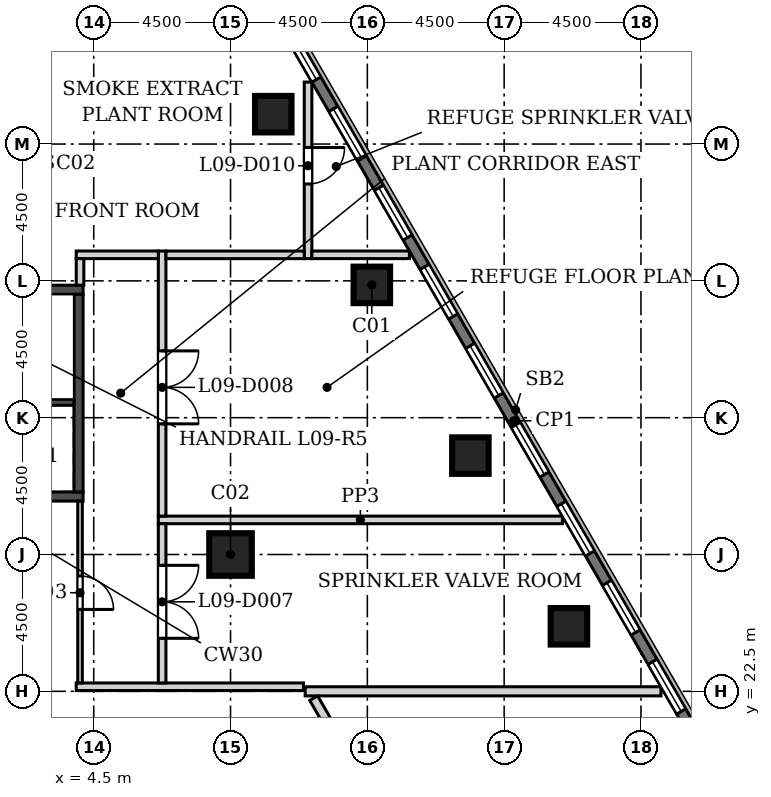
"""IFC4 building model, lengths in metres.
Left out: names, types, materials, properties, quantities, classifications, styles, units other than length and angle.
Written with IfcOpenShell. Run it as: python <this file> out.ifc"""

import sys

from ifc_helpers import new_model, si_unit, direction, frame, frame_2d, origin, origin_2d, place, context, subcontext, project, spatial, rectangle, extrude, element, fill, save


model = new_model("IFC4")
c1 = context("Model", 3, precision=1e-05, world=origin(), true_north=direction((0.0, 1.0)))
c2 = subcontext(c1, "Body", "Model", "MODEL_VIEW")
j1 = project(units=[si_unit("LENGTHUNIT", "METRE"), si_unit("PLANEANGLEUNIT", "RADIAN")], contexts=[c1])
p1 = place(None, origin())
s1 = spatial("IfcSite", under=j1, at=p1, CompositionType="ELEMENT")
p2 = place(p1, origin())
s2 = spatial("IfcBuilding", under=s1, at=p2, CompositionType="ELEMENT")
p3 = place(p2, frame((0.0, 0.0, 47.5)))
s3 = spatial("IfcBuildingStorey", under=s2, at=p3, CompositionType="ELEMENT", Elevation=47.5)
for number, where, z_axis, x_axis in (
    (1, (20.131, 24.638, 0.0), (0.0, 0.0, 1.0), (1.0, 0.0, 0.0)),
    (2, (16.889, 30.253, 0.0), (0.0, 0.0, 1.0), (1.0, 0.0, 0.0)),
    (3, (13.648, 35.868, 0.0), (0.0, 0.0, 1.0), (1.0, 0.0, 0.0)),
    (4, (10.406, 41.482, 0.0), (0.0, 0.0, 1.0), (1.0, 0.0, 0.0)),
):
    element("IfcColumn", number, at=place(p3, frame(where, z_axis=z_axis, x_axis=x_axis)), inside=s3, PredefinedType="COLUMN", context=c2, shape_type="SweptSolid", body=[
        extrude(rectangle(XDim=1.2, YDim=1.2, at=origin_2d()), origin(), (0.0, 0.0, 1.0), 5.4),
    ])
p4 = place(p3, frame((9.0, 27.0, 0.0), z_axis=(0.0, 0.0, 1.0), x_axis=(1.0, 0.0, 0.0)))
e5 = element("IfcColumn", 5, at=p4, inside=s3, PredefinedType="COLUMN", context=c2, shape_type="SweptSolid", body=[
    extrude(rectangle(XDim=1.4, YDim=1.4, at=origin_2d()), origin(), (0.0, 0.0, 1.0), 5.4),
])
p5 = place(p3, frame((31.98, 7.709, 0.0), z_axis=(0.0, 0.0, 1.0), x_axis=(-0.500000125387, 0.866025331392, 0.0)))
e6 = element("IfcWall", 6, at=p5, inside=s3, PredefinedType="SOLIDWALL", context=c2, shape_type="SweptSolid", body=[
    extrude(rectangle(XDim=55.255, YDim=0.34, at=frame_2d((27.628, 0.0))), origin(), (0.0, 0.0, 1.0), 5.1),
])
p6 = place(p5, frame((1.314, 0.0, 0.9)))
e7 = element("IfcOpeningElement", 7, at=p6, cuts=e6, PredefinedType="OPENING", context=c2, shape_type="SweptSolid", body=[
    extrude(rectangle(XDim=1.885, YDim=3.0, at=frame_2d((0.942, 1.5))), frame((0.0, 0.18, 0.0), z_axis=(0.0, -1.0, 0.0), x_axis=(1.0, 0.0, 0.0)), (0.0, 0.0, 1.0), 0.36),
])
p7 = place(p5, frame((4.314, 0.0, 0.9)))
e8 = element("IfcOpeningElement", 8, at=p7, cuts=e6, PredefinedType="OPENING", context=c2, shape_type="SweptSolid", body=[
    extrude(rectangle(XDim=1.885, YDim=3.0, at=frame_2d((0.942, 1.5))), frame((0.0, 0.18, 0.0), z_axis=(0.0, -1.0, 0.0), x_axis=(1.0, 0.0, 0.0)), (0.0, 0.0, 1.0), 0.36),
])
p8 = place(p5, frame((7.314, 0.0, 0.9)))
e9 = element("IfcOpeningElement", 9, at=p8, cuts=e6, PredefinedType="OPENING", context=c2, shape_type="SweptSolid", body=[
    extrude(rectangle(XDim=1.885, YDim=3.0, at=frame_2d((0.942, 1.5))), frame((0.0, 0.18, 0.0), z_axis=(0.0, -1.0, 0.0), x_axis=(1.0, 0.0, 0.0)), (0.0, 0.0, 1.0), 0.36),
])
p9 = place(p5, frame((10.314, 0.0, 0.9)))
e10 = element("IfcOpeningElement", 10, at=p9, cuts=e6, PredefinedType="OPENING", context=c2, shape_type="SweptSolid", body=[
    extrude(rectangle(XDim=1.885, YDim=3.0, at=frame_2d((0.942, 1.5))), frame((0.0, 0.18, 0.0), z_axis=(0.0, -1.0, 0.0), x_axis=(1.0, 0.0, 0.0)), (0.0, 0.0, 1.0), 0.36),
])
p10 = place(p5, frame((13.314, 0.0, 0.9)))
e11 = element("IfcOpeningElement", 11, at=p10, cuts=e6, PredefinedType="OPENING", context=c2, shape_type="SweptSolid", body=[
    extrude(rectangle(XDim=1.885, YDim=3.0, at=frame_2d((0.942, 1.5))), frame((0.0, 0.18, 0.0), z_axis=(0.0, -1.0, 0.0), x_axis=(1.0, 0.0, 0.0)), (0.0, 0.0, 1.0), 0.36),
])
p11 = place(p5, frame((16.314, 0.0, 0.9)))
e12 = element("IfcOpeningElement", 12, at=p11, cuts=e6, PredefinedType="OPENING", context=c2, shape_type="SweptSolid", body=[
    extrude(rectangle(XDim=1.885, YDim=3.0, at=frame_2d((0.942, 1.5))), frame((0.0, 0.18, 0.0), z_axis=(0.0, -1.0, 0.0), x_axis=(1.0, 0.0, 0.0)), (0.0, 0.0, 1.0), 0.36),
])
p12 = place(p5, frame((19.314, 0.0, 0.9)))
e13 = element("IfcOpeningElement", 13, at=p12, cuts=e6, PredefinedType="OPENING", context=c2, shape_type="SweptSolid", body=[
    extrude(rectangle(XDim=1.885, YDim=3.0, at=frame_2d((0.942, 1.5))), frame((0.0, 0.18, 0.0), z_axis=(0.0, -1.0, 0.0), x_axis=(1.0, 0.0, 0.0)), (0.0, 0.0, 1.0), 0.36),
])
p13 = place(p5, frame((22.314, 0.0, 0.9)))
e14 = element("IfcOpeningElement", 14, at=p13, cuts=e6, PredefinedType="OPENING", context=c2, shape_type="SweptSolid", body=[
    extrude(rectangle(XDim=1.885, YDim=3.0, at=frame_2d((0.942, 1.5))), frame((0.0, 0.18, 0.0), z_axis=(0.0, -1.0, 0.0), x_axis=(1.0, 0.0, 0.0)), (0.0, 0.0, 1.0), 0.36),
])
p14 = place(p5, frame((25.314, 0.0, 0.9)))
e15 = element("IfcOpeningElement", 15, at=p14, cuts=e6, PredefinedType="OPENING", context=c2, shape_type="SweptSolid", body=[
    extrude(rectangle(XDim=1.885, YDim=3.0, at=frame_2d((0.942, 1.5))), frame((0.0, 0.18, 0.0), z_axis=(0.0, -1.0, 0.0), x_axis=(1.0, 0.0, 0.0)), (0.0, 0.0, 1.0), 0.36),
])
p15 = place(p5, frame((28.314, 0.0, 0.9)))
e16 = element("IfcOpeningElement", 16, at=p15, cuts=e6, PredefinedType="OPENING", context=c2, shape_type="SweptSolid", body=[
    extrude(rectangle(XDim=1.885, YDim=3.0, at=frame_2d((0.942, 1.5))), frame((0.0, 0.18, 0.0), z_axis=(0.0, -1.0, 0.0), x_axis=(1.0, 0.0, 0.0)), (0.0, 0.0, 1.0), 0.36),
])
p16 = place(p5, frame((31.314, 0.0, 0.9)))
e17 = element("IfcOpeningElement", 17, at=p16, cuts=e6, PredefinedType="OPENING", context=c2, shape_type="SweptSolid", body=[
    extrude(rectangle(XDim=1.885, YDim=3.0, at=frame_2d((0.942, 1.5))), frame((0.0, 0.18, 0.0), z_axis=(0.0, -1.0, 0.0), x_axis=(1.0, 0.0, 0.0)), (0.0, 0.0, 1.0), 0.36),
])
p17 = place(p5, frame((34.314, 0.0, 0.9)))
e18 = element("IfcOpeningElement", 18, at=p17, cuts=e6, PredefinedType="OPENING", context=c2, shape_type="SweptSolid", body=[
    extrude(rectangle(XDim=1.885, YDim=3.0, at=frame_2d((0.942, 1.5))), frame((0.0, 0.18, 0.0), z_axis=(0.0, -1.0, 0.0), x_axis=(1.0, 0.0, 0.0)), (0.0, 0.0, 1.0), 0.36),
])
p18 = place(p5, frame((37.314, 0.0, 0.9)))
e19 = element("IfcOpeningElement", 19, at=p18, cuts=e6, PredefinedType="OPENING", context=c2, shape_type="SweptSolid", body=[
    extrude(rectangle(XDim=1.885, YDim=3.0, at=frame_2d((0.942, 1.5))), frame((0.0, 0.18, 0.0), z_axis=(0.0, -1.0, 0.0), x_axis=(1.0, 0.0, 0.0)), (0.0, 0.0, 1.0), 0.36),
])
p19 = place(p5, frame((40.314, 0.0, 0.9)))
e20 = element("IfcOpeningElement", 20, at=p19, cuts=e6, PredefinedType="OPENING", context=c2, shape_type="SweptSolid", body=[
    extrude(rectangle(XDim=1.885, YDim=3.0, at=frame_2d((0.942, 1.5))), frame((0.0, 0.18, 0.0), z_axis=(0.0, -1.0, 0.0), x_axis=(1.0, 0.0, 0.0)), (0.0, 0.0, 1.0), 0.36),
])
p20 = place(p5, frame((43.314, 0.0, 0.9)))
e21 = element("IfcOpeningElement", 21, at=p20, cuts=e6, PredefinedType="OPENING", context=c2, shape_type="SweptSolid", body=[
    extrude(rectangle(XDim=1.885, YDim=3.0, at=frame_2d((0.942, 1.5))), frame((0.0, 0.18, 0.0), z_axis=(0.0, -1.0, 0.0), x_axis=(1.0, 0.0, 0.0)), (0.0, 0.0, 1.0), 0.36),
])
p21 = place(p5, frame((46.314, 0.0, 0.9)))
e22 = element("IfcOpeningElement", 22, at=p21, cuts=e6, PredefinedType="OPENING", context=c2, shape_type="SweptSolid", body=[
    extrude(rectangle(XDim=1.885, YDim=3.0, at=frame_2d((0.942, 1.5))), frame((0.0, 0.18, 0.0), z_axis=(0.0, -1.0, 0.0), x_axis=(1.0, 0.0, 0.0)), (0.0, 0.0, 1.0), 0.36),
])
p22 = place(p5, frame((49.314, 0.0, 0.9)))
e23 = element("IfcOpeningElement", 23, at=p22, cuts=e6, PredefinedType="OPENING", context=c2, shape_type="SweptSolid", body=[
    extrude(rectangle(XDim=1.885, YDim=3.0, at=frame_2d((0.942, 1.5))), frame((0.0, 0.18, 0.0), z_axis=(0.0, -1.0, 0.0), x_axis=(1.0, 0.0, 0.0)), (0.0, 0.0, 1.0), 0.36),
])
p23 = place(p5, frame((52.314, 0.0, 0.9)))
e24 = element("IfcOpeningElement", 24, at=p23, cuts=e6, PredefinedType="OPENING", context=c2, shape_type="SweptSolid", body=[
    extrude(rectangle(XDim=1.885, YDim=3.0, at=frame_2d((0.942, 1.5))), frame((0.0, 0.18, 0.0), z_axis=(0.0, -1.0, 0.0), x_axis=(1.0, 0.0, 0.0)), (0.0, 0.0, 1.0), 0.36),
])
p24 = place(p3, frame((-4.15, 28.907, -0.3), z_axis=(0.0, 0.0, 1.0), x_axis=(1.0, 0.0, 0.0)))
e25 = element("IfcWall", 25, at=p24, inside=s3, PredefinedType="SOLIDWALL", context=c2, shape_type="SweptSolid", body=[
    extrude(rectangle(XDim=8.3, YDim=0.3, at=frame_2d((4.15, 0.0))), origin(), (0.0, 0.0, 1.0), 5.4),
])
p25 = place(p24, frame((1.55, 0.0, 0.3)))
e26 = element("IfcOpeningElement", 26, at=p25, cuts=e25, PredefinedType="OPENING", context=c2, shape_type="SweptSolid", body=[
    extrude(rectangle(XDim=1.2, YDim=2.1, at=frame_2d((0.6, 1.05))), frame((0.0, 0.16, 0.0), z_axis=(0.0, -1.0, 0.0), x_axis=(1.0, 0.0, 0.0)), (0.0, 0.0, 1.0), 0.32),
])
p26 = place(p3, frame((-4.15, 35.707, -0.3), z_axis=(0.0, 0.0, 1.0), x_axis=(1.0, 0.0, 0.0)))
e27 = element("IfcWall", 27, at=p26, inside=s3, PredefinedType="SOLIDWALL", context=c2, shape_type="SweptSolid", body=[
    extrude(rectangle(XDim=8.3, YDim=0.3, at=frame_2d((4.15, 0.0))), origin(), (0.0, 0.0, 1.0), 5.4),
])
p27 = place(p3, frame((4.0, 29.057, -0.3), z_axis=(0.0, 0.0, 1.0), x_axis=(0.0, 1.0, 0.0)))
e28 = element("IfcWall", 28, at=p27, inside=s3, PredefinedType="SOLIDWALL", context=c2, shape_type="SweptSolid", body=[
    extrude(rectangle(XDim=6.5, YDim=0.3, at=frame_2d((3.25, 0.0))), origin(), (0.0, 0.0, 1.0), 5.4),
])
p28 = place(p3, frame((-3.85, 32.007, -0.3), z_axis=(0.0, 0.0, 1.0), x_axis=(1.0, 0.0, 0.0)))
e29 = element("IfcWall", 29, at=p28, inside=s3, PredefinedType="SOLIDWALL", context=c2, shape_type="SweptSolid", body=[
    extrude(rectangle(XDim=7.7, YDim=0.2, at=frame_2d((3.85, 0.0))), origin(), (0.0, 0.0, 1.0), 5.4),
])
p29 = place(p28, frame((0.1, 0.0, 0.3)))
e30 = element("IfcOpeningElement", 30, at=p29, cuts=e29, PredefinedType="OPENING", context=c2, shape_type="SweptSolid", body=[
    extrude(rectangle(XDim=1.2, YDim=2.1, at=frame_2d((0.6, 1.05))), frame((0.0, 0.11, 0.0), z_axis=(0.0, -1.0, 0.0), x_axis=(1.0, 0.0, 0.0)), (0.0, 0.0, 1.0), 0.22),
])
p30 = place(p3, frame((6.625, 28.138, 0.0), z_axis=(0.0, 0.0, 1.0), x_axis=(1.0, 0.0, 0.0)))
e31 = element("IfcWall", 31, at=p30, inside=s3, PredefinedType="SOLIDWALL", context=c2, shape_type="SweptSolid", body=[
    extrude(rectangle(XDim=13.292, YDim=0.25, at=frame_2d((6.646, 0.0))), origin(), (0.0, 0.0, 1.0), 5.1),
])
p31 = place(p3, frame((11.456, 22.5, 0.0), z_axis=(0.0, 0.0, 1.0), x_axis=(1.0, 0.0, 0.0)))
e32 = element("IfcWall", 32, at=p31, inside=s3, PredefinedType="SOLIDWALL", context=c2, shape_type="SweptSolid", body=[
    extrude(rectangle(XDim=11.702, YDim=0.3, at=frame_2d((5.851, 0.0))), origin(), (0.0, 0.0, 1.0), 5.1),
])
p32 = place(p3, frame((11.736, 22.275, 0.0), z_axis=(0.0, 0.0, 1.0), x_axis=(0.499992738267, -0.866029596307, 0.0)))
e33 = element("IfcWall", 33, at=p32, inside=s3, PredefinedType="SOLIDWALL", context=c2, shape_type="SweptSolid", body=[
    extrude(rectangle(XDim=11.624, YDim=0.3, at=frame_2d((5.812, 0.0))), origin(), (0.0, 0.0, 1.0), 5.1),
])
p33 = place(p3, frame((6.75, 36.981, 0.0), z_axis=(0.0, 0.0, 1.0), x_axis=(0.0, -1.0, 0.0)))
e34 = element("IfcWall", 34, at=p33, inside=s3, PredefinedType="SOLIDWALL", context=c2, shape_type="SweptSolid", body=[
    extrude(rectangle(XDim=8.718, YDim=0.25, at=frame_2d((4.359, 0.0))), origin(), (0.0, 0.0, 1.0), 5.1),
])
p34 = place(p33, frame((3.284, 0.0, 0.0)))
e35 = element("IfcOpeningElement", 35, at=p34, cuts=e34, PredefinedType="OPENING", context=c2, shape_type="SweptSolid", body=[
    extrude(rectangle(XDim=2.4, YDim=2.4, at=frame_2d((1.2, 1.2))), frame((0.0, 0.135, 0.0), z_axis=(0.0, -1.0, 0.0), x_axis=(1.0, 0.0, 0.0)), (0.0, 0.0, 1.0), 0.27),
])
p35 = place(p3, frame((3.925, 22.65, 0.0), z_axis=(0.0, 0.0, 1.0), x_axis=(1.0, 0.0, 0.0)))
e36 = element("IfcWall", 36, at=p35, inside=s3, PredefinedType="SOLIDWALL", context=c2, shape_type="SweptSolid", body=[
    extrude(rectangle(XDim=7.475, YDim=0.25, at=frame_2d((3.737, 0.0))), origin(), (0.0, 0.0, 1.0), 5.1),
])
p36 = place(p3, frame((4.05, 28.757, 0.0), z_axis=(0.0, 0.0, 1.0), x_axis=(0.0, -1.0, 0.0)))
e37 = element("IfcWall", 37, at=p36, inside=s3, PredefinedType="PARTITIONING", context=c2, shape_type="SweptSolid", body=[
    extrude(rectangle(XDim=5.982, YDim=0.15, at=frame_2d((2.991, 0.0))), origin(), (0.0, 0.0, 1.0), 5.1),
])
p37 = place(p36, frame((2.464, 0.0, 0.0)))
e38 = element("IfcOpeningElement", 38, at=p37, cuts=e37, PredefinedType="OPENING", context=c2, shape_type="SweptSolid", body=[
    extrude(rectangle(XDim=1.1, YDim=2.1, at=frame_2d((0.55, 1.05))), frame((0.0, 0.085, 0.0), z_axis=(0.0, -1.0, 0.0), x_axis=(1.0, 0.0, 0.0)), (0.0, 0.0, 1.0), 0.17),
])
p38 = place(p3, frame((11.55, 42.539, 0.0), z_axis=(0.0, 0.0, 1.0), x_axis=(0.0, -1.0, 0.0)))
e39 = element("IfcWall", 39, at=p38, inside=s3, PredefinedType="SOLIDWALL", context=c2, shape_type="SweptSolid", body=[
    extrude(rectangle(XDim=5.807, YDim=0.25, at=frame_2d((2.904, 0.0))), origin(), (0.0, 0.0, 1.0), 5.1),
])
p39 = place(p38, frame((2.153, 0.0, 0.0)))
e40 = element("IfcOpeningElement", 40, at=p39, cuts=e39, PredefinedType="OPENING", context=c2, shape_type="SweptSolid", body=[
    extrude(rectangle(XDim=1.2, YDim=2.1, at=frame_2d((0.6, 1.05))), frame((0.0, 0.135, 0.0), z_axis=(0.0, -1.0, 0.0), x_axis=(1.0, 0.0, 0.0)), (0.0, 0.0, 1.0), 0.27),
])
p40 = place(p3, frame((6.75, 28.013, 0.0), z_axis=(0.0, 0.0, 1.0), x_axis=(0.0, -1.0, 0.0)))
e41 = element("IfcWall", 41, at=p40, inside=s3, PredefinedType="SOLIDWALL", context=c2, shape_type="SweptSolid", body=[
    extrude(rectangle(XDim=5.238, YDim=0.25, at=frame_2d((2.619, 0.0))), origin(), (0.0, 0.0, 1.0), 5.1),
])
p41 = place(p40, frame((1.369, 0.0, 0.0)))
e42 = element("IfcOpeningElement", 42, at=p41, cuts=e41, PredefinedType="OPENING", context=c2, shape_type="SweptSolid", body=[
    extrude(rectangle(XDim=2.4, YDim=2.4, at=frame_2d((1.2, 1.2))), frame((0.0, 0.135, 0.0), z_axis=(0.0, -1.0, 0.0), x_axis=(1.0, 0.0, 0.0)), (0.0, 0.0, 1.0), 0.27),
])
p42 = place(p3, frame((11.425, 36.856, 0.0), z_axis=(0.0, 0.0, 1.0), x_axis=(-1.0, 0.0, 0.0)))
e43 = element("IfcWall", 43, at=p42, inside=s3, PredefinedType="SOLIDWALL", context=c2, shape_type="SweptSolid", body=[
    extrude(rectangle(XDim=4.55, YDim=0.25, at=frame_2d((2.275, 0.0))), origin(), (0.0, 0.0, 1.0), 5.1),
])
p43 = place(p3, frame((11.675, 36.857, 0.0), z_axis=(0.0, 0.0, 1.0), x_axis=(1.0, 0.0, 0.0)))
e44 = element("IfcWall", 44, at=p43, inside=s3, PredefinedType="SOLIDWALL", context=c2, shape_type="SweptSolid", body=[
    extrude(rectangle(XDim=3.208, YDim=0.25, at=frame_2d((1.604, 0.0))), origin(), (0.0, 0.0, 1.0), 5.1),
])
p44 = place(p3, frame((3.925, 36.857, 0.0), z_axis=(0.0, 0.0, 1.0), x_axis=(1.0, 0.0, 0.0)))
e45 = element("IfcWall", 45, at=p44, inside=s3, PredefinedType="SOLIDWALL", context=c2, shape_type="SweptSolid", body=[
    extrude(rectangle(XDim=2.7, YDim=0.25, at=frame_2d((1.35, 0.0))), origin(), (0.0, 0.0, 1.0), 5.1),
])
p45 = place(p3, frame((4.05, 35.857, 0.0), z_axis=(0.0, 0.0, 1.0), x_axis=(0.0, 1.0, 0.0)))
e46 = element("IfcWall", 46, at=p45, inside=s3, PredefinedType="SOLIDWALL", context=c2, shape_type="SweptSolid", body=[
    extrude(rectangle(XDim=0.875, YDim=0.25, at=frame_2d((0.438, 0.0))), origin(), (0.0, 0.0, 1.0), 5.1),
])
p46 = place(p11, origin())
e47 = element("IfcWindow", 47, at=p46, inside=s3, PartitioningType="SINGLE_PANEL", PredefinedType="WINDOW", context=c2, shape_type="SweptSolid", body=[
    extrude(rectangle(XDim=1.885, YDim=3.0, at=frame_2d((0.942, 1.5))), frame((0.0, 0.11, 0.0), z_axis=(0.0, -1.0, 0.0), x_axis=(1.0, 0.0, 0.0)), (0.0, 0.0, 1.0), 0.06),
])
fill(e12, e47)
p47 = place(p12, origin())
e48 = element("IfcWindow", 48, at=p47, inside=s3, PartitioningType="SINGLE_PANEL", PredefinedType="WINDOW", context=c2, shape_type="SweptSolid", body=[
    extrude(rectangle(XDim=1.885, YDim=3.0, at=frame_2d((0.942, 1.5))), frame((0.0, 0.11, 0.0), z_axis=(0.0, -1.0, 0.0), x_axis=(1.0, 0.0, 0.0)), (0.0, 0.0, 1.0), 0.06),
])
fill(e13, e48)
p48 = place(p13, origin())
e49 = element("IfcWindow", 49, at=p48, inside=s3, PartitioningType="SINGLE_PANEL", PredefinedType="WINDOW", context=c2, shape_type="SweptSolid", body=[
    extrude(rectangle(XDim=1.885, YDim=3.0, at=frame_2d((0.942, 1.5))), frame((0.0, 0.11, 0.0), z_axis=(0.0, -1.0, 0.0), x_axis=(1.0, 0.0, 0.0)), (0.0, 0.0, 1.0), 0.06),
])
fill(e14, e49)
p49 = place(p14, origin())
e50 = element("IfcWindow", 50, at=p49, inside=s3, PartitioningType="SINGLE_PANEL", PredefinedType="WINDOW", context=c2, shape_type="SweptSolid", body=[
    extrude(rectangle(XDim=1.885, YDim=3.0, at=frame_2d((0.942, 1.5))), frame((0.0, 0.11, 0.0), z_axis=(0.0, -1.0, 0.0), x_axis=(1.0, 0.0, 0.0)), (0.0, 0.0, 1.0), 0.06),
])
fill(e15, e50)
p50 = place(p15, origin())
e51 = element("IfcWindow", 51, at=p50, inside=s3, PartitioningType="SINGLE_PANEL", PredefinedType="WINDOW", context=c2, shape_type="SweptSolid", body=[
    extrude(rectangle(XDim=1.885, YDim=3.0, at=frame_2d((0.942, 1.5))), frame((0.0, 0.11, 0.0), z_axis=(0.0, -1.0, 0.0), x_axis=(1.0, 0.0, 0.0)), (0.0, 0.0, 1.0), 0.06),
])
fill(e16, e51)
p51 = place(p16, origin())
e52 = element("IfcWindow", 52, at=p51, inside=s3, PartitioningType="SINGLE_PANEL", PredefinedType="WINDOW", context=c2, shape_type="SweptSolid", body=[
    extrude(rectangle(XDim=1.885, YDim=3.0, at=frame_2d((0.942, 1.5))), frame((0.0, 0.11, 0.0), z_axis=(0.0, -1.0, 0.0), x_axis=(1.0, 0.0, 0.0)), (0.0, 0.0, 1.0), 0.06),
])
fill(e17, e52)
p52 = place(p17, origin())
e53 = element("IfcWindow", 53, at=p52, inside=s3, PartitioningType="SINGLE_PANEL", PredefinedType="WINDOW", context=c2, shape_type="SweptSolid", body=[
    extrude(rectangle(XDim=1.885, YDim=3.0, at=frame_2d((0.942, 1.5))), frame((0.0, 0.11, 0.0), z_axis=(0.0, -1.0, 0.0), x_axis=(1.0, 0.0, 0.0)), (0.0, 0.0, 1.0), 0.06),
])
fill(e18, e53)
p53 = place(p18, origin())
e54 = element("IfcWindow", 54, at=p53, inside=s3, PartitioningType="SINGLE_PANEL", PredefinedType="WINDOW", context=c2, shape_type="SweptSolid", body=[
    extrude(rectangle(XDim=1.885, YDim=3.0, at=frame_2d((0.942, 1.5))), frame((0.0, 0.11, 0.0), z_axis=(0.0, -1.0, 0.0), x_axis=(1.0, 0.0, 0.0)), (0.0, 0.0, 1.0), 0.06),
])
fill(e19, e54)
p54 = place(p19, origin())
e55 = element("IfcWindow", 55, at=p54, inside=s3, PartitioningType="SINGLE_PANEL", PredefinedType="WINDOW", context=c2, shape_type="SweptSolid", body=[
    extrude(rectangle(XDim=1.885, YDim=3.0, at=frame_2d((0.942, 1.5))), frame((0.0, 0.11, 0.0), z_axis=(0.0, -1.0, 0.0), x_axis=(1.0, 0.0, 0.0)), (0.0, 0.0, 1.0), 0.06),
])
fill(e20, e55)
p55 = place(p37, origin())
e56 = element("IfcDoor", 56, at=p55, inside=s3, OperationType="SINGLE_SWING_RIGHT", PredefinedType="DOOR", context=c2, shape_type="SweptSolid", body=[
    extrude(rectangle(XDim=1.1, YDim=2.1, at=frame_2d((0.55, 1.05))), frame((0.0, 0.025, 0.0), z_axis=(0.0, -1.0, 0.0), x_axis=(1.0, 0.0, 0.0)), (0.0, 0.0, 1.0), 0.05),
])
fill(e38, e56)
p56 = place(p41, origin())
e57 = element("IfcDoor", 57, at=p56, inside=s3, OperationType="DOUBLE_DOOR_SINGLE_SWING", PredefinedType="DOOR", context=c2, shape_type="SweptSolid", body=[
    extrude(rectangle(XDim=2.4, YDim=2.4, at=frame_2d((1.2, 1.2))), frame((0.0, 0.025, 0.0), z_axis=(0.0, -1.0, 0.0), x_axis=(1.0, 0.0, 0.0)), (0.0, 0.0, 1.0), 0.05),
])
fill(e42, e57)
p57 = place(p34, origin())
e58 = element("IfcDoor", 58, at=p57, inside=s3, OperationType="DOUBLE_DOOR_SINGLE_SWING", PredefinedType="DOOR", context=c2, shape_type="SweptSolid", body=[
    extrude(rectangle(XDim=2.4, YDim=2.4, at=frame_2d((1.2, 1.2))), frame((0.0, 0.025, 0.0), z_axis=(0.0, -1.0, 0.0), x_axis=(1.0, 0.0, 0.0)), (0.0, 0.0, 1.0), 0.05),
])
fill(e35, e58)
p58 = place(p39, origin())
e59 = element("IfcDoor", 59, at=p58, inside=s3, OperationType="SINGLE_SWING_LEFT", PredefinedType="DOOR", context=c2, shape_type="SweptSolid", body=[
    extrude(rectangle(XDim=1.2, YDim=2.1, at=frame_2d((0.6, 1.05))), frame((0.0, 0.025, 0.0), z_axis=(0.0, -1.0, 0.0), x_axis=(1.0, 0.0, 0.0)), (0.0, 0.0, 1.0), 0.05),
])
fill(e40, e59)
save(model, sys.argv[1])
